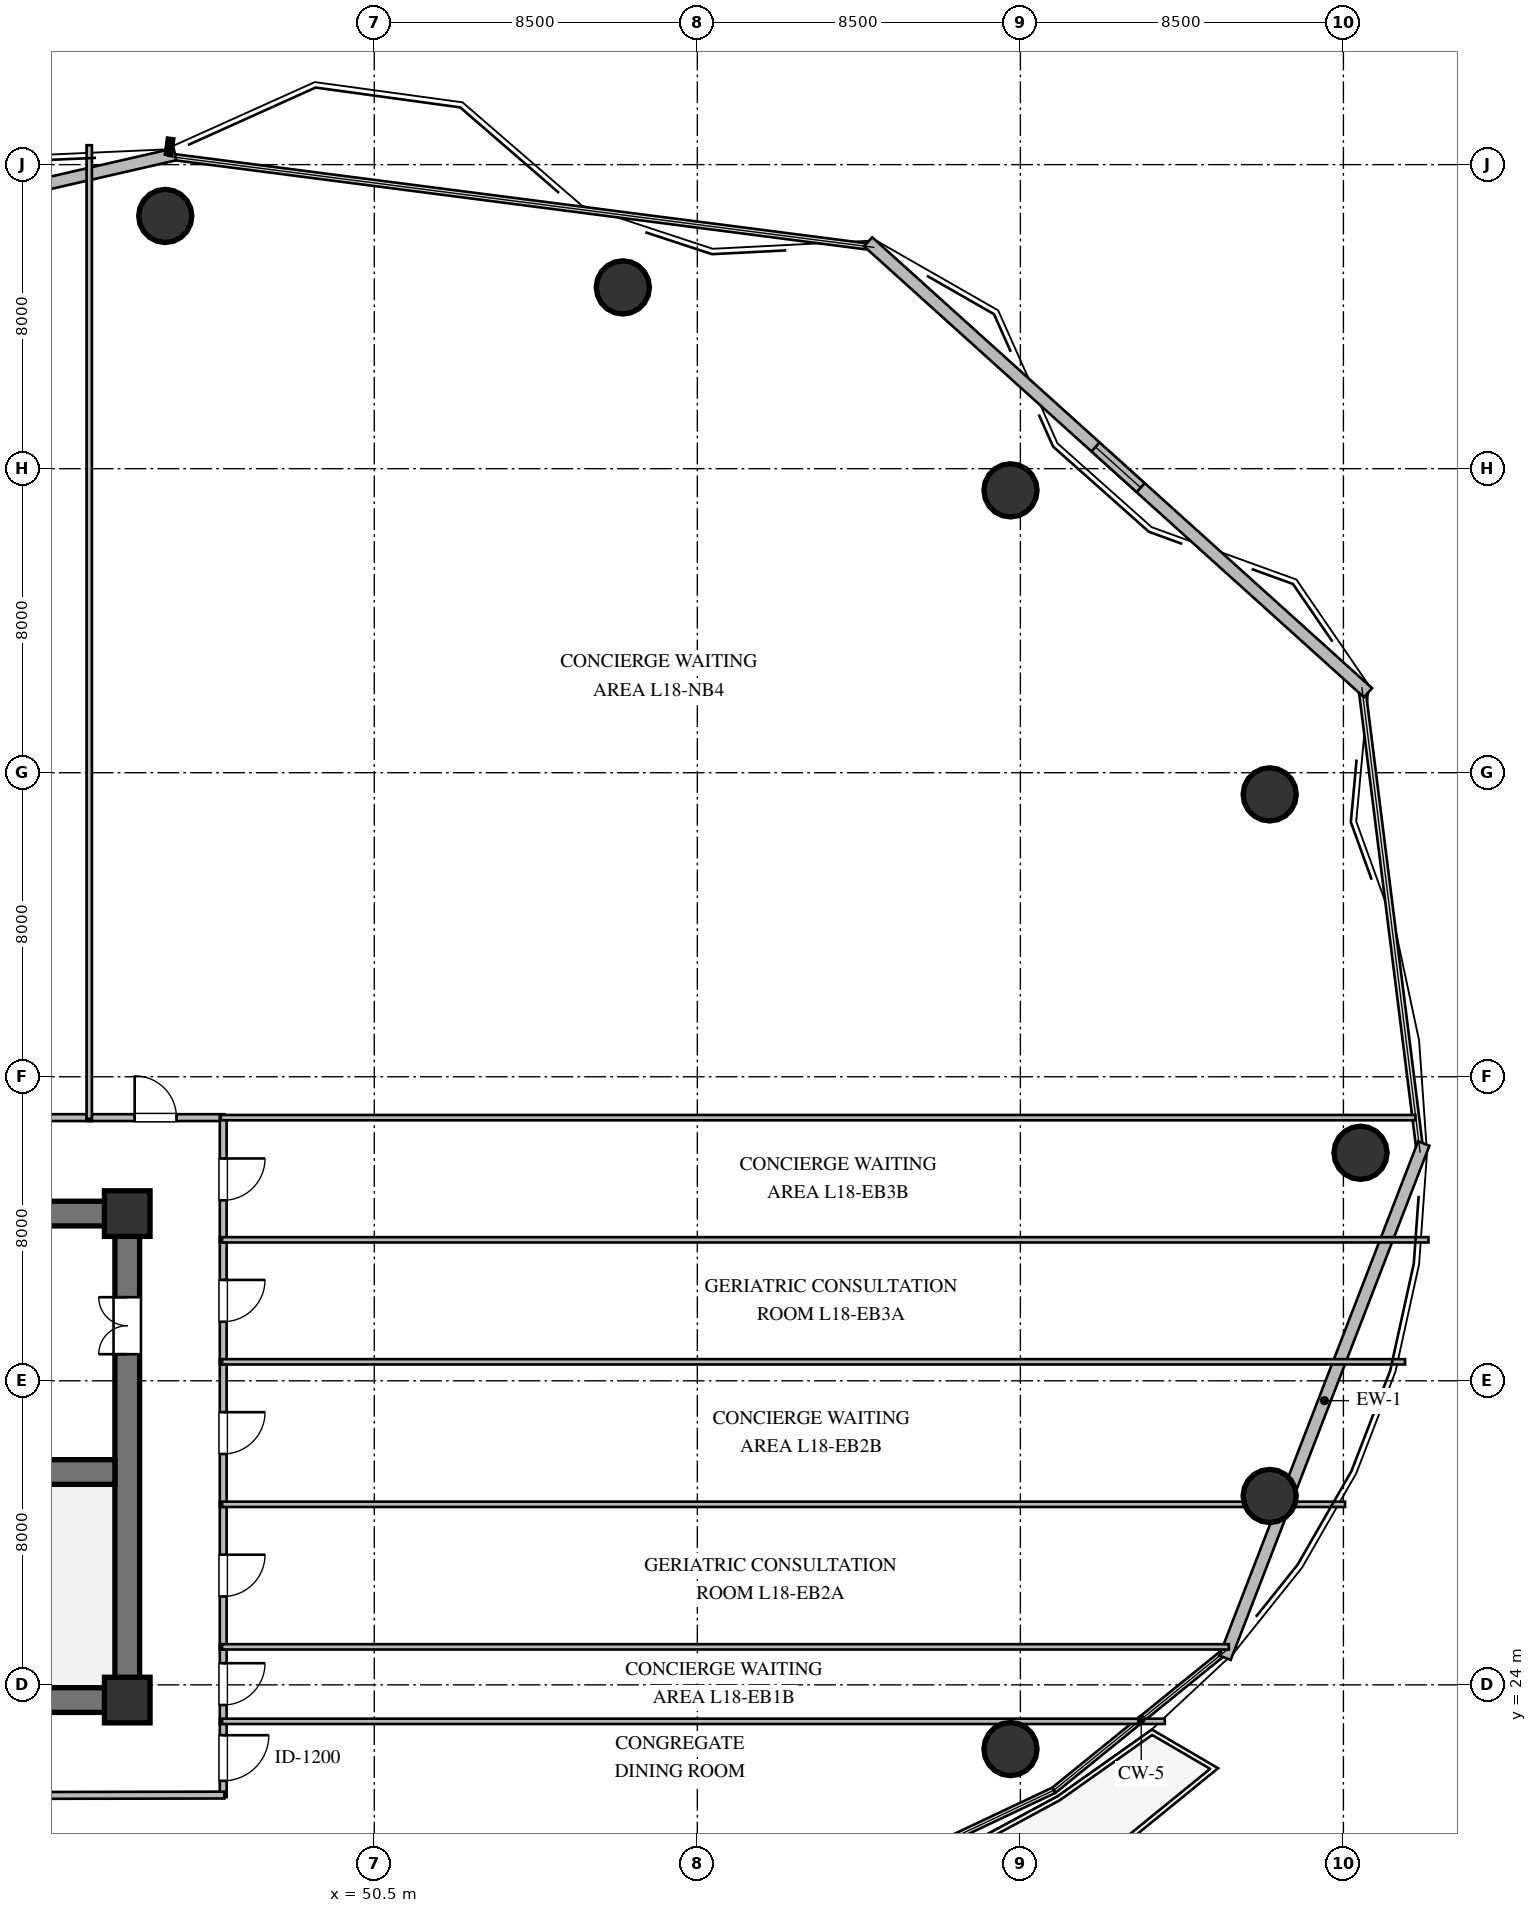
"""IFC4 building model, lengths in metres.
Left out: names, types, materials, properties, quantities, classifications, styles, units other than length and angle.
Written with IfcOpenShell. Run it as: python <this file> out.ifc"""

import sys

from ifc_helpers import new_model, si_unit, direction, frame, frame_2d, origin, origin_2d, place, context, subcontext, project, spatial, rectangle, circle, extrude, element, fill, save


model = new_model("IFC4")
c1 = context("Model", 3, precision=1e-05, world=origin(), true_north=direction((0.0, 1.0)))
c2 = subcontext(c1, "Body", "Model", "MODEL_VIEW")
j1 = project(units=[si_unit("LENGTHUNIT", "METRE"), si_unit("PLANEANGLEUNIT", "RADIAN")], contexts=[c1])
p1 = place(None, origin())
s1 = spatial("IfcSite", under=j1, at=p1, CompositionType="ELEMENT")
p2 = place(p1, origin())
s2 = spatial("IfcBuilding", under=s1, at=p2, CompositionType="ELEMENT")
p3 = place(p2, frame((0.0, 0.0, 70.8)))
s3 = spatial("IfcBuildingStorey", under=s2, at=p3, CompositionType="ELEMENT", Elevation=70.8)
for number, where, z_axis, x_axis in (
    (1, (21.675, 23.6, 0.0), (0.0, 0.0, 1.0), (1.0, 0.0, 0.0)),
    (2, (21.675, 36.4, 0.0), (0.0, 0.0, 1.0), (1.0, 0.0, 0.0)),
):
    element("IfcWall", number, at=place(p3, frame(where, z_axis=z_axis, x_axis=x_axis)), inside=s3, PredefinedType="SHEAR", context=c2, shape_type="SweptSolid", body=[
        extrude(rectangle(XDim=22.65, YDim=0.65, at=frame_2d((11.325, 0.0))), origin(), (0.0, 0.0, 1.0), 3.36),
    ])
p4 = place(p3, frame((44.0, 23.925, 0.0), z_axis=(0.0, 0.0, 1.0), x_axis=(0.0, 1.0, 0.0)))
e3 = element("IfcWall", 3, at=p4, inside=s3, PredefinedType="SHEAR", context=c2, shape_type="SweptSolid", body=[
    extrude(rectangle(XDim=12.15, YDim=0.65, at=frame_2d((6.075, 0.0))), origin(), (0.0, 0.0, 1.0), 3.36),
])
p5 = place(p4, frame((8.775, 0.0, 0.0)))
e4 = element("IfcOpeningElement", 4, at=p5, cuts=e3, PredefinedType="OPENING", context=c2, shape_type="SweptSolid", body=[
    extrude(rectangle(XDim=1.5, YDim=2.15, at=frame_2d((0.75, 1.075))), frame((0.0, 0.335, 0.0), z_axis=(0.0, -1.0, 0.0), x_axis=(1.0, 0.0, 0.0)), (0.0, 0.0, 1.0), 0.67),
])
p6 = place(p3, frame((22.325, 29.6, 0.0), z_axis=(0.0, 0.0, 1.0), x_axis=(1.0, 0.0, 0.0)))
e5 = element("IfcWall", 5, at=p6, inside=s3, PredefinedType="SHEAR", context=c2, shape_type="SweptSolid", body=[
    extrude(rectangle(XDim=21.35, YDim=0.65, at=frame_2d((10.675, 0.0))), origin(), (0.0, 0.0, 1.0), 3.36),
])
p7 = place(p6, frame((12.125, 0.0, 0.0)))
e6 = element("IfcOpeningElement", 6, at=p7, cuts=e5, PredefinedType="OPENING", context=c2, shape_type="SweptSolid", body=[
    extrude(rectangle(XDim=1.15, YDim=2.1, at=frame_2d((0.575, 1.05))), frame((0.0, 0.335, 0.0), z_axis=(0.0, -1.0, 0.0), x_axis=(1.0, 0.0, 0.0)), (0.0, 0.0, 1.0), 0.67),
])
for number, where, z_axis, x_axis in (
    (7, (44.0, 23.6, 0.0), (0.0, 0.0, 1.0), (1.0, 0.0, 0.0)),
    (8, (44.0, 36.4, 0.0), (0.0, 0.0, 1.0), (1.0, 0.0, 0.0)),
):
    element("IfcColumn", number, at=place(p3, frame(where, z_axis=z_axis, x_axis=x_axis)), inside=s3, PredefinedType="COLUMN", context=c2, shape_type="SweptSolid", body=[
        extrude(rectangle(XDim=1.2, YDim=1.2, at=origin_2d()), origin(), (0.0, 0.0, 1.0), 3.6),
    ])
for number, where, z_axis, x_axis in (
    (9, (76.45, 38.0, 0.0), (0.0, 0.0, 1.0), (1.0, 0.0, 0.0)),
    (10, (74.06, 47.43, 0.0), (0.0, 0.0, 1.0), (1.0, 0.0, 0.0)),
    (11, (67.24, 55.43, 0.0), (0.0, 0.0, 1.0), (1.0, 0.0, 0.0)),
    (12, (57.04, 60.77, 0.0), (0.0, 0.0, 1.0), (1.0, 0.0, 0.0)),
    (13, (45.0, 62.65, 0.0), (0.0, 0.0, 1.0), (1.0, 0.0, 0.0)),
    (14, (67.24, 22.31, 0.0), (0.0, 0.0, 1.0), (1.0, 0.0, 0.0)),
    (15, (74.06, 28.97, 0.0), (0.0, 0.0, 1.0), (1.0, 0.0, 0.0)),
):
    element("IfcColumn", number, at=place(p3, frame(where, z_axis=z_axis, x_axis=x_axis)), inside=s3, PredefinedType="COLUMN", context=c2, shape_type="SweptSolid", body=[
        extrude(circle(Radius=0.7, at=origin_2d()), origin(), (0.0, 0.0, 1.0), 3.6),
    ])
p8 = place(p3, frame((78.114, 38.243, 0.0), z_axis=(0.0, 0.0, 1.0), x_axis=(-0.360517110943, -0.932752599952, 0.0)))
e16 = element("IfcWall", 16, at=p8, inside=s3, PredefinedType="STANDARD", context=c2, shape_type="SweptSolid", body=[
    extrude(rectangle(XDim=14.504, YDim=0.32, at=frame_2d((7.252, 0.0))), origin(), (0.0, 0.0, 1.0), 2.738),
])
p9 = place(p3, frame((27.164, 60.126, 0.0), z_axis=(0.0, 0.0, 1.0), x_axis=(0.974744906433, 0.22332122018, 0.0)))
e17 = element("IfcWall", 17, at=p9, inside=s3, PredefinedType="STANDARD", context=c2, shape_type="SweptSolid", body=[
    extrude(rectangle(XDim=18.561, YDim=0.32, at=frame_2d((9.28, 0.0))), origin(), (0.0, 0.0, 1.0), 3.36),
])
p10 = place(p9, frame((8.481, 0.0, 1.05)))
e18 = element("IfcOpeningElement", 18, at=p10, cuts=e17, PredefinedType="OPENING", context=c2, shape_type="SweptSolid", body=[
    extrude(rectangle(XDim=1.6, YDim=1.5, at=frame_2d((0.8, 0.75))), frame((0.0, 0.17, 0.0), z_axis=(0.0, -1.0, 0.0), x_axis=(1.0, 0.0, 0.0)), (0.0, 0.0, 1.0), 0.34),
])
p11 = place(p3, frame((63.494, 61.969, 0.0), z_axis=(0.0, 0.0, 1.0), x_axis=(0.7425569544, -0.669782927128, 0.0)))
e19 = element("IfcWall", 19, at=p11, inside=s3, PredefinedType="STANDARD", context=c2, shape_type="SweptSolid", body=[
    extrude(rectangle(XDim=17.713, YDim=0.32, at=frame_2d((8.856, 0.0))), origin(), (0.0, 0.0, 1.0), 3.36),
])
p12 = place(p11, frame((8.057, 0.0, 1.05)))
e20 = element("IfcOpeningElement", 20, at=p12, cuts=e19, PredefinedType="OPENING", context=c2, shape_type="SweptSolid", body=[
    extrude(rectangle(XDim=1.6, YDim=1.5, at=frame_2d((0.8, 0.75))), frame((0.0, 0.17, 0.0), z_axis=(0.0, -1.0, 0.0), x_axis=(1.0, 0.0, 0.0)), (0.0, 0.0, 1.0), 0.34),
])
p13 = place(p3, frame((37.935, 38.925, 0.0), z_axis=(0.0, 0.0, 1.0), x_axis=(1.0, 0.0, 0.0)))
e21 = element("IfcWall", 21, at=p13, inside=s3, PredefinedType="PARTITIONING", context=c2, shape_type="SweptSolid", body=[
    extrude(rectangle(XDim=5.13, YDim=0.18, at=frame_2d((2.565, 0.0))), origin(), (0.0, 0.0, 1.0), 3.36),
])
p14 = place(p13, frame((2.015, 0.0, 0.0)))
e22 = element("IfcOpeningElement", 22, at=p14, cuts=e21, PredefinedType="OPENING", context=c2, shape_type="SweptSolid", body=[
    extrude(rectangle(XDim=1.1, YDim=2.1, at=frame_2d((0.55, 1.05))), frame((0.0, 0.1, 0.0), z_axis=(0.0, -1.0, 0.0), x_axis=(1.0, 0.0, 0.0)), (0.0, 0.0, 1.0), 0.2),
])
p15 = place(p3, frame((42.935, 38.925, 0.0), z_axis=(0.0, 0.0, 1.0), x_axis=(1.0, 0.0, 0.0)))
e23 = element("IfcWall", 23, at=p15, inside=s3, PredefinedType="PARTITIONING", context=c2, shape_type="SweptSolid", body=[
    extrude(rectangle(XDim=3.62, YDim=0.18, at=frame_2d((1.81, 0.0))), origin(), (0.0, 0.0, 1.0), 3.36),
])
p16 = place(p15, frame((1.26, 0.0, 0.0)))
e24 = element("IfcOpeningElement", 24, at=p16, cuts=e23, PredefinedType="OPENING", context=c2, shape_type="SweptSolid", body=[
    extrude(rectangle(XDim=1.1, YDim=2.1, at=frame_2d((0.55, 1.05))), frame((0.0, 0.1, 0.0), z_axis=(0.0, -1.0, 0.0), x_axis=(1.0, 0.0, 0.0)), (0.0, 0.0, 1.0), 0.2),
])
p17 = place(p3, frame((46.525, 23.105, 0.0), z_axis=(0.0, 0.0, 1.0), x_axis=(0.0, -1.0, 0.0)))
e25 = element("IfcWall", 25, at=p17, inside=s3, PredefinedType="PARTITIONING", context=c2, shape_type="SweptSolid", body=[
    extrude(rectangle(XDim=2.06, YDim=0.18, at=frame_2d((1.03, 0.0))), origin(), (0.0, 0.0, 1.0), 3.36),
])
p18 = place(p17, frame((0.43, 0.0, 0.0)))
e26 = element("IfcOpeningElement", 26, at=p18, cuts=e25, PredefinedType="OPENING", context=c2, shape_type="SweptSolid", body=[
    extrude(rectangle(XDim=1.2, YDim=2.15, at=frame_2d((0.6, 1.075))), frame((0.0, 0.1, 0.0), z_axis=(0.0, -1.0, 0.0), x_axis=(1.0, 0.0, 0.0)), (0.0, 0.0, 1.0), 0.2),
])
p19 = place(p3, frame((46.525, 25.065, 0.0), z_axis=(0.0, 0.0, 1.0), x_axis=(0.0, -1.0, 0.0)))
e27 = element("IfcWall", 27, at=p19, inside=s3, PredefinedType="PARTITIONING", context=c2, shape_type="SweptSolid", body=[
    extrude(rectangle(XDim=2.09, YDim=0.18, at=frame_2d((1.045, 0.0))), origin(), (0.0, 0.0, 1.0), 3.36),
])
p20 = place(p19, frame((0.495, 0.0, 0.0)))
e28 = element("IfcOpeningElement", 28, at=p20, cuts=e27, PredefinedType="OPENING", context=c2, shape_type="SweptSolid", body=[
    extrude(rectangle(XDim=1.1, YDim=2.1, at=frame_2d((0.55, 1.05))), frame((0.0, 0.1, 0.0), z_axis=(0.0, -1.0, 0.0), x_axis=(1.0, 0.0, 0.0)), (0.0, 0.0, 1.0), 0.2),
])
p21 = place(p3, frame((46.525, 28.815, 0.0), z_axis=(0.0, 0.0, 1.0), x_axis=(0.0, -1.0, 0.0)))
e29 = element("IfcWall", 29, at=p21, inside=s3, PredefinedType="PARTITIONING", context=c2, shape_type="SweptSolid", body=[
    extrude(rectangle(XDim=3.88, YDim=0.18, at=frame_2d((1.94, 0.0))), origin(), (0.0, 0.0, 1.0), 3.36),
])
p22 = place(p21, frame((1.39, 0.0, 0.0)))
e30 = element("IfcOpeningElement", 30, at=p22, cuts=e29, PredefinedType="OPENING", context=c2, shape_type="SweptSolid", body=[
    extrude(rectangle(XDim=1.1, YDim=2.1, at=frame_2d((0.55, 1.05))), frame((0.0, 0.1, 0.0), z_axis=(0.0, -1.0, 0.0), x_axis=(1.0, 0.0, 0.0)), (0.0, 0.0, 1.0), 0.2),
])
p23 = place(p3, frame((46.525, 32.565, 0.0), z_axis=(0.0, 0.0, 1.0), x_axis=(0.0, -1.0, 0.0)))
e31 = element("IfcWall", 31, at=p23, inside=s3, PredefinedType="PARTITIONING", context=c2, shape_type="SweptSolid", body=[
    extrude(rectangle(XDim=3.88, YDim=0.18, at=frame_2d((1.94, 0.0))), origin(), (0.0, 0.0, 1.0), 3.36),
])
p24 = place(p23, frame((1.39, 0.0, 0.0)))
e32 = element("IfcOpeningElement", 32, at=p24, cuts=e31, PredefinedType="OPENING", context=c2, shape_type="SweptSolid", body=[
    extrude(rectangle(XDim=1.1, YDim=2.1, at=frame_2d((0.55, 1.05))), frame((0.0, 0.1, 0.0), z_axis=(0.0, -1.0, 0.0), x_axis=(1.0, 0.0, 0.0)), (0.0, 0.0, 1.0), 0.2),
])
p25 = place(p3, frame((46.525, 35.775, 0.0), z_axis=(0.0, 0.0, 1.0), x_axis=(0.0, -1.0, 0.0)))
e33 = element("IfcWall", 33, at=p25, inside=s3, PredefinedType="PARTITIONING", context=c2, shape_type="SweptSolid", body=[
    extrude(rectangle(XDim=3.34, YDim=0.18, at=frame_2d((1.67, 0.0))), origin(), (0.0, 0.0, 1.0), 3.36),
])
p26 = place(p25, frame((1.12, 0.0, 0.0)))
e34 = element("IfcOpeningElement", 34, at=p26, cuts=e33, PredefinedType="OPENING", context=c2, shape_type="SweptSolid", body=[
    extrude(rectangle(XDim=1.1, YDim=2.1, at=frame_2d((0.55, 1.05))), frame((0.0, 0.1, 0.0), z_axis=(0.0, -1.0, 0.0), x_axis=(1.0, 0.0, 0.0)), (0.0, 0.0, 1.0), 0.2),
])
p27 = place(p3, frame((46.525, 38.955, 0.0), z_axis=(0.0, 0.0, 1.0), x_axis=(0.0, -1.0, 0.0)))
e35 = element("IfcWall", 35, at=p27, inside=s3, PredefinedType="PARTITIONING", context=c2, shape_type="SweptSolid", body=[
    extrude(rectangle(XDim=3.31, YDim=0.18, at=frame_2d((1.655, 0.0))), origin(), (0.0, 0.0, 1.0), 3.36),
])
p28 = place(p27, frame((1.105, 0.0, 0.0)))
e36 = element("IfcOpeningElement", 36, at=p28, cuts=e35, PredefinedType="OPENING", context=c2, shape_type="SweptSolid", body=[
    extrude(rectangle(XDim=1.1, YDim=2.1, at=frame_2d((0.55, 1.05))), frame((0.0, 0.1, 0.0), z_axis=(0.0, -1.0, 0.0), x_axis=(1.0, 0.0, 0.0)), (0.0, 0.0, 1.0), 0.2),
])
p29 = place(p3, frame((46.555, 21.1, 0.0), z_axis=(0.0, 0.0, 1.0), x_axis=(-0.999998414151, -0.001780925679, 0.0)))
e37 = element("IfcWall", 37, at=p29, inside=s3, PredefinedType="PARTITIONING", context=c2, shape_type="SweptSolid", body=[
    extrude(rectangle(XDim=14.12, YDim=0.18, at=frame_2d((7.06, 0.0))), origin(), (0.0, 0.0, 1.0), 2.996),
])
p30 = place(p29, frame((6.51, 0.0, 0.0)))
e38 = element("IfcOpeningElement", 38, at=p30, cuts=e37, PredefinedType="OPENING", context=c2, shape_type="SweptSolid", body=[
    extrude(rectangle(XDim=1.1, YDim=2.1, at=frame_2d((0.55, 1.05))), frame((0.0, 0.1, 0.0), z_axis=(0.0, -1.0, 0.0), x_axis=(1.0, 0.0, 0.0)), (0.0, 0.0, 1.0), 0.2),
])
p31 = place(p3, frame((43.0, 64.511, 0.0), z_axis=(0.0, 0.0, 1.0), x_axis=(0.0, -1.0, 0.0)))
e39 = element("IfcWall", 39, at=p31, inside=s3, PredefinedType="PARTITIONING", context=c2, shape_type="SweptSolid", body=[
    extrude(rectangle(XDim=25.616, YDim=0.14, at=frame_2d((12.808, 0.0))), origin(), (0.0, 0.0, 1.0), 3.36),
])
p32 = place(p3, frame((77.894, 38.925, 0.0), z_axis=(0.0, 0.0, 1.0), x_axis=(-1.0, 0.0, 0.0)))
e40 = element("IfcWall", 40, at=p32, inside=s3, PredefinedType="PARTITIONING", context=c2, shape_type="SweptSolid", body=[
    extrude(rectangle(XDim=31.434, YDim=0.14, at=frame_2d((15.717, 0.0))), origin(), (0.0, 0.0, 1.0), 3.36),
])
p33 = place(p3, frame((46.495, 23.04, 0.0), z_axis=(0.0, 0.0, 1.0), x_axis=(1.0, 0.0, 0.0)))
e41 = element("IfcWall", 41, at=p33, inside=s3, PredefinedType="PARTITIONING", context=c2, shape_type="SweptSolid", body=[
    extrude(rectangle(XDim=24.806, YDim=0.14, at=frame_2d((12.403, 0.0))), origin(), (0.0, 0.0, 1.0), 2.806),
])
p34 = place(p3, frame((46.495, 25.0, 0.0), z_axis=(0.0, 0.0, 1.0), x_axis=(1.0, 0.0, 0.0)))
e42 = element("IfcWall", 42, at=p34, inside=s3, PredefinedType="PARTITIONING", context=c2, shape_type="SweptSolid", body=[
    extrude(rectangle(XDim=26.49, YDim=0.14, at=frame_2d((13.245, 0.0))), origin(), (0.0, 0.0, 1.0), 2.806),
])
p35 = place(p3, frame((46.495, 28.75, 0.0), z_axis=(0.0, 0.0, 1.0), x_axis=(1.0, 0.0, 0.0)))
e43 = element("IfcWall", 43, at=p35, inside=s3, PredefinedType="PARTITIONING", context=c2, shape_type="SweptSolid", body=[
    extrude(rectangle(XDim=29.548, YDim=0.14, at=frame_2d((14.774, 0.0))), origin(), (0.0, 0.0, 1.0), 2.806),
])
p36 = place(p3, frame((46.495, 32.5, 0.0), z_axis=(0.0, 0.0, 1.0), x_axis=(1.0, 0.0, 0.0)))
e44 = element("IfcWall", 44, at=p36, inside=s3, PredefinedType="PARTITIONING", context=c2, shape_type="SweptSolid", body=[
    extrude(rectangle(XDim=31.127, YDim=0.14, at=frame_2d((15.563, 0.0))), origin(), (0.0, 0.0, 1.0), 3.36),
])
p37 = place(p3, frame((46.495, 35.71, 0.0), z_axis=(0.0, 0.0, 1.0), x_axis=(1.0, 0.0, 0.0)))
e45 = element("IfcWall", 45, at=p37, inside=s3, PredefinedType="PARTITIONING", context=c2, shape_type="SweptSolid", body=[
    extrude(rectangle(XDim=31.742, YDim=0.14, at=frame_2d((15.871, 0.0))), origin(), (0.0, 0.0, 1.0), 3.36),
])
p38 = place(p12, origin())
e46 = element("IfcWindow", 46, at=p38, inside=s3, PartitioningType="SINGLE_PANEL", PredefinedType="WINDOW", context=c2, shape_type="SweptSolid", body=[
    extrude(rectangle(XDim=1.6, YDim=1.5, at=frame_2d((0.8, 0.75))), frame((0.0, 0.03, 0.0), z_axis=(0.0, -1.0, 0.0), x_axis=(1.0, 0.0, 0.0)), (0.0, 0.0, 1.0), 0.06),
])
fill(e20, e46)
p39 = place(p5, origin())
e47 = element("IfcDoor", 47, at=p39, inside=s3, OperationType="DOUBLE_DOOR_SINGLE_SWING", PredefinedType="DOOR", context=c2, shape_type="SweptSolid", body=[
    extrude(rectangle(XDim=1.5, YDim=2.15, at=frame_2d((0.75, 1.075))), frame((0.0, 0.025, 0.0), z_axis=(0.0, -1.0, 0.0), x_axis=(1.0, 0.0, 0.0)), (0.0, 0.0, 1.0), 0.05),
])
fill(e4, e47)
p40 = place(p16, origin())
e48 = element("IfcDoor", 48, at=p40, inside=s3, OperationType="SINGLE_SWING_LEFT", PredefinedType="DOOR", context=c2, shape_type="SweptSolid", body=[
    extrude(rectangle(XDim=1.1, YDim=2.1, at=frame_2d((0.55, 1.05))), frame((0.0, 0.025, 0.0), z_axis=(0.0, -1.0, 0.0), x_axis=(1.0, 0.0, 0.0)), (0.0, 0.0, 1.0), 0.05),
])
fill(e24, e48)
p41 = place(p18, origin())
e49 = element("IfcDoor", 49, at=p41, inside=s3, OperationType="SINGLE_SWING_LEFT", PredefinedType="DOOR", context=c2, shape_type="SweptSolid", body=[
    extrude(rectangle(XDim=1.2, YDim=2.15, at=frame_2d((0.6, 1.075))), frame((0.0, 0.025, 0.0), z_axis=(0.0, -1.0, 0.0), x_axis=(1.0, 0.0, 0.0)), (0.0, 0.0, 1.0), 0.05),
])
fill(e26, e49)
p42 = place(p20, origin())
e50 = element("IfcDoor", 50, at=p42, inside=s3, OperationType="SINGLE_SWING_LEFT", PredefinedType="DOOR", context=c2, shape_type="SweptSolid", body=[
    extrude(rectangle(XDim=1.1, YDim=2.1, at=frame_2d((0.55, 1.05))), frame((0.0, 0.025, 0.0), z_axis=(0.0, -1.0, 0.0), x_axis=(1.0, 0.0, 0.0)), (0.0, 0.0, 1.0), 0.05),
])
fill(e28, e50)
p43 = place(p22, origin())
e51 = element("IfcDoor", 51, at=p43, inside=s3, OperationType="SINGLE_SWING_LEFT", PredefinedType="DOOR", context=c2, shape_type="SweptSolid", body=[
    extrude(rectangle(XDim=1.1, YDim=2.1, at=frame_2d((0.55, 1.05))), frame((0.0, 0.025, 0.0), z_axis=(0.0, -1.0, 0.0), x_axis=(1.0, 0.0, 0.0)), (0.0, 0.0, 1.0), 0.05),
])
fill(e30, e51)
p44 = place(p24, origin())
e52 = element("IfcDoor", 52, at=p44, inside=s3, OperationType="SINGLE_SWING_LEFT", PredefinedType="DOOR", context=c2, shape_type="SweptSolid", body=[
    extrude(rectangle(XDim=1.1, YDim=2.1, at=frame_2d((0.55, 1.05))), frame((0.0, 0.025, 0.0), z_axis=(0.0, -1.0, 0.0), x_axis=(1.0, 0.0, 0.0)), (0.0, 0.0, 1.0), 0.05),
])
fill(e32, e52)
p45 = place(p26, origin())
e53 = element("IfcDoor", 53, at=p45, inside=s3, OperationType="SINGLE_SWING_LEFT", PredefinedType="DOOR", context=c2, shape_type="SweptSolid", body=[
    extrude(rectangle(XDim=1.1, YDim=2.1, at=frame_2d((0.55, 1.05))), frame((0.0, 0.025, 0.0), z_axis=(0.0, -1.0, 0.0), x_axis=(1.0, 0.0, 0.0)), (0.0, 0.0, 1.0), 0.05),
])
fill(e34, e53)
p46 = place(p28, origin())
e54 = element("IfcDoor", 54, at=p46, inside=s3, OperationType="SINGLE_SWING_LEFT", PredefinedType="DOOR", context=c2, shape_type="SweptSolid", body=[
    extrude(rectangle(XDim=1.1, YDim=2.1, at=frame_2d((0.55, 1.05))), frame((0.0, 0.025, 0.0), z_axis=(0.0, -1.0, 0.0), x_axis=(1.0, 0.0, 0.0)), (0.0, 0.0, 1.0), 0.05),
])
fill(e36, e54)
save(model, sys.argv[1])
